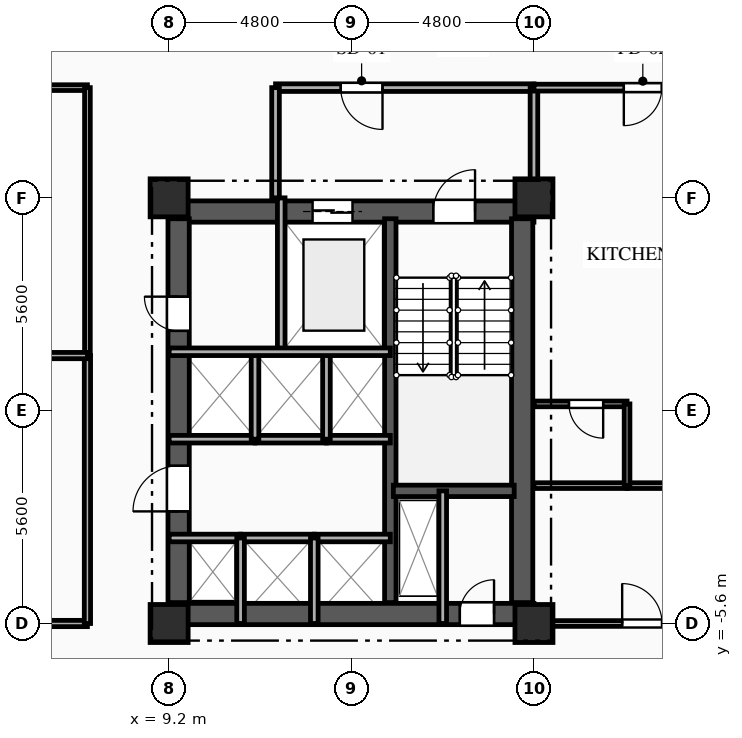
"""IFC4 building model, lengths in metres.
Left out: names, types, materials, properties, quantities, classifications, styles, units other than length and angle.
Written with IfcOpenShell. Run it as: python <this file> out.ifc"""

import sys

from ifc_helpers import new_model, si_unit, direction, frame, frame_2d, origin, origin_2d, place, context, subcontext, project, spatial, rectangle, extrude, element, fill, save


model = new_model("IFC4")
c1 = context("Model", 3, precision=1e-05, world=origin(), true_north=direction((0.0, 1.0)))
c2 = subcontext(c1, "Body", "Model", "MODEL_VIEW")
j1 = project(units=[si_unit("LENGTHUNIT", "METRE"), si_unit("PLANEANGLEUNIT", "RADIAN")], contexts=[c1])
p1 = place(None, origin())
s1 = spatial("IfcSite", under=j1, at=p1, CompositionType="ELEMENT")
p2 = place(p1, origin())
s2 = spatial("IfcBuilding", under=s1, at=p2, CompositionType="ELEMENT")
p3 = place(p2, frame((0.0, 0.0, 102.45)))
s3 = spatial("IfcBuildingStorey", under=s2, at=p3, CompositionType="ELEMENT", Elevation=102.45)
for number, where, z_axis, x_axis in (
    (1, (9.2, -5.6, 0.0), (0.0, 0.0, 1.0), (1.0, 0.0, 0.0)),
    (2, (9.2, 5.6, 0.0), (0.0, 0.0, 1.0), (1.0, 0.0, 0.0)),
    (3, (18.8, -5.6, 0.0), (0.0, 0.0, 1.0), (1.0, 0.0, 0.0)),
    (4, (18.8, 5.6, 0.0), (0.0, 0.0, 1.0), (1.0, 0.0, 0.0)),
):
    element("IfcColumn", number, at=place(p3, frame(where, z_axis=z_axis, x_axis=x_axis)), inside=s3, PredefinedType="COLUMN", context=c2, shape_type="SweptSolid", body=[
        extrude(rectangle(XDim=1.0, YDim=1.0, at=origin_2d()), origin(), (0.0, 0.0, 1.0), 3.35),
    ])
p4 = place(p3, frame((9.2, 5.24, 0.0), z_axis=(0.0, 0.0, 1.0), x_axis=(1.0, 0.0, 0.0)))
e5 = element("IfcWall", 5, at=p4, inside=s3, PredefinedType="SHEAR", context=c2, shape_type="SweptSolid", body=[
    extrude(rectangle(XDim=9.6, YDim=0.56, at=frame_2d((4.8, 0.0))), origin(), (0.0, 0.0, 1.0), 3.045),
])
p5 = place(p4, frame((6.95, 0.0, 0.0)))
e6 = element("IfcOpeningElement", 6, at=p5, cuts=e5, PredefinedType="OPENING", context=c2, shape_type="SweptSolid", body=[
    extrude(rectangle(XDim=1.1, YDim=2.15, at=frame_2d((0.55, 1.075))), frame((0.0, 0.29, 0.0), z_axis=(0.0, -1.0, 0.0), x_axis=(1.0, 0.0, 0.0)), (0.0, 0.0, 1.0), 0.58),
])
p6 = place(p4, frame((3.775, 0.0, 0.0)))
e7 = element("IfcOpeningElement", 7, at=p6, cuts=e5, PredefinedType="OPENING", context=c2, shape_type="SweptSolid", body=[
    extrude(rectangle(XDim=1.05, YDim=2.1, at=frame_2d((0.525, 1.05))), frame((0.0, 0.29, 0.0), z_axis=(0.0, -1.0, 0.0), x_axis=(1.0, 0.0, 0.0)), (0.0, 0.0, 1.0), 0.58),
])
p7 = place(p3, frame((9.2, -5.35, 0.0), z_axis=(0.0, 0.0, 1.0), x_axis=(1.0, 0.0, 0.0)))
e8 = element("IfcWall", 8, at=p7, inside=s3, PredefinedType="SHEAR", context=c2, shape_type="SweptSolid", body=[
    extrude(rectangle(XDim=9.6, YDim=0.56, at=frame_2d((4.8, 0.0))), origin(), (0.0, 0.0, 1.0), 3.045),
])
p8 = place(p7, frame((7.65, 0.0, 0.0)))
e9 = element("IfcOpeningElement", 9, at=p8, cuts=e8, PredefinedType="OPENING", context=c2, shape_type="SweptSolid", body=[
    extrude(rectangle(XDim=0.9, YDim=2.1, at=frame_2d((0.45, 1.05))), frame((0.0, 0.29, 0.0), z_axis=(0.0, -1.0, 0.0), x_axis=(1.0, 0.0, 0.0)), (0.0, 0.0, 1.0), 0.58),
])
p9 = place(p3, frame((9.45, -5.05, 0.0), z_axis=(0.0, 0.0, 1.0), x_axis=(0.0, 1.0, 0.0)))
e10 = element("IfcWall", 10, at=p9, inside=s3, PredefinedType="SHEAR", context=c2, shape_type="SweptSolid", body=[
    extrude(rectangle(XDim=10.1, YDim=0.56, at=frame_2d((5.05, 0.0))), origin(), (0.0, 0.0, 1.0), 3.045),
])
p10 = place(p9, frame((7.15, 0.0, 0.0)))
e11 = element("IfcOpeningElement", 11, at=p10, cuts=e10, PredefinedType="OPENING", context=c2, shape_type="SweptSolid", body=[
    extrude(rectangle(XDim=0.9, YDim=2.1, at=frame_2d((0.45, 1.05))), frame((0.0, 0.29, 0.0), z_axis=(0.0, -1.0, 0.0), x_axis=(1.0, 0.0, 0.0)), (0.0, 0.0, 1.0), 0.58),
])
p11 = place(p9, frame((2.4, 0.0, 0.0)))
e12 = element("IfcOpeningElement", 12, at=p11, cuts=e10, PredefinedType="OPENING", context=c2, shape_type="SweptSolid", body=[
    extrude(rectangle(XDim=1.2, YDim=2.15, at=frame_2d((0.6, 1.075))), frame((0.0, 0.29, 0.0), z_axis=(0.0, -1.0, 0.0), x_axis=(1.0, 0.0, 0.0)), (0.0, 0.0, 1.0), 0.58),
])
p12 = place(p3, frame((18.49, -5.05, 0.0), z_axis=(0.0, 0.0, 1.0), x_axis=(0.0, 1.0, 0.0)))
e13 = element("IfcWall", 13, at=p12, inside=s3, PredefinedType="SHEAR", context=c2, shape_type="SweptSolid", body=[
    extrude(rectangle(XDim=10.1, YDim=0.56, at=frame_2d((5.05, 0.0))), origin(), (0.0, 0.0, 1.0), 3.045),
])
p13 = place(p3, frame((15.02, -5.05, 0.0), z_axis=(0.0, 0.0, 1.0), x_axis=(0.0, 1.0, 0.0)))
e14 = element("IfcWall", 14, at=p13, inside=s3, PredefinedType="SHEAR", context=c2, shape_type="SweptSolid", body=[
    extrude(rectangle(XDim=10.1, YDim=0.3, at=frame_2d((5.05, 0.0))), origin(), (0.0, 0.0, 1.0), 3.045),
])
p14 = place(p3, frame((15.1, -2.11, 0.0), z_axis=(0.0, 0.0, 1.0), x_axis=(1.0, 0.0, 0.0)))
e15 = element("IfcWall", 15, at=p14, inside=s3, PredefinedType="SHEAR", context=c2, shape_type="SweptSolid", body=[
    extrude(rectangle(XDim=3.18, YDim=0.3, at=frame_2d((1.59, 0.0))), origin(), (0.0, 0.0, 1.0), 3.045),
])
p15 = place(p3, frame((16.4, -2.11, 0.0), z_axis=(0.0, 0.0, 1.0), x_axis=(0.0, -1.0, 0.0)))
e16 = element("IfcWall", 16, at=p15, inside=s3, PredefinedType="PARTITIONING", context=c2, shape_type="SweptSolid", body=[
    extrude(rectangle(XDim=3.49, YDim=0.2, at=frame_2d((1.745, 0.0))), origin(), (0.0, 0.0, 1.0), 3.045),
])
p16 = place(p3, frame((12.15, 5.6, 0.0), z_axis=(0.0, 0.0, 1.0), x_axis=(0.0, -1.0, 0.0)))
e17 = element("IfcWall", 17, at=p16, inside=s3, PredefinedType="PARTITIONING", context=c2, shape_type="SweptSolid", body=[
    extrude(rectangle(XDim=4.05, YDim=0.2, at=frame_2d((2.025, 0.0))), origin(), (0.0, 0.0, 1.0), 3.045),
])
p17 = place(p3, frame((18.8, 8.5, 0.0), z_axis=(0.0, 0.0, 1.0), x_axis=(-1.0, 0.0, 0.0)))
e18 = element("IfcWall", 18, at=p17, inside=s3, PredefinedType="PARTITIONING", context=c2, shape_type="SweptSolid", body=[
    extrude(rectangle(XDim=6.8, YDim=0.2, at=frame_2d((3.4, 0.0))), origin(), (0.0, 0.0, 1.0), 3.045),
])
p18 = place(p17, frame((3.985, 0.0, 0.0)))
e19 = element("IfcOpeningElement", 19, at=p18, cuts=e18, PredefinedType="OPENING", context=c2, shape_type="SweptSolid", body=[
    extrude(rectangle(XDim=1.1, YDim=2.15, at=frame_2d((0.55, 1.075))), frame((0.0, 0.11, 0.0), z_axis=(0.0, -1.0, 0.0), x_axis=(1.0, 0.0, 0.0)), (0.0, 0.0, 1.0), 0.22),
])
p19 = place(p3, frame((12.0, 8.5, 0.0), z_axis=(0.0, 0.0, 1.0), x_axis=(0.0, -1.0, 0.0)))
e20 = element("IfcWall", 20, at=p19, inside=s3, PredefinedType="PARTITIONING", context=c2, shape_type="SweptSolid", body=[
    extrude(rectangle(XDim=2.9, YDim=0.2, at=frame_2d((1.45, 0.0))), origin(), (0.0, 0.0, 1.0), 3.045),
])
p20 = place(p3, frame((18.8, 5.6, 0.0), z_axis=(0.0, 0.0, 1.0), x_axis=(0.0, 1.0, 0.0)))
e21 = element("IfcWall", 21, at=p20, inside=s3, PredefinedType="PARTITIONING", context=c2, shape_type="SweptSolid", body=[
    extrude(rectangle(XDim=2.9, YDim=0.2, at=frame_2d((1.45, 0.0))), origin(), (0.0, 0.0, 1.0), 2.53),
])
p21 = place(p3, frame((9.2, -3.35, 0.0), z_axis=(0.0, 0.0, 1.0), x_axis=(1.0, 0.0, 0.0)))
e22 = element("IfcWall", 22, at=p21, inside=s3, PredefinedType="PARTITIONING", context=c2, shape_type="SweptSolid", body=[
    extrude(rectangle(XDim=1.88, YDim=0.2, at=frame_2d((0.94, 0.0))), origin(), (0.0, 0.0, 1.0), 2.76),
])
p22 = place(p3, frame((11.08, -3.35, 0.0), z_axis=(0.0, 0.0, 1.0), x_axis=(1.0, 0.0, 0.0)))
e23 = element("IfcWall", 23, at=p22, inside=s3, PredefinedType="PARTITIONING", context=c2, shape_type="SweptSolid", body=[
    extrude(rectangle(XDim=1.94, YDim=0.2, at=frame_2d((0.97, 0.0))), origin(), (0.0, 0.0, 1.0), 3.045),
])
p23 = place(p3, frame((13.02, -3.35, 0.0), z_axis=(0.0, 0.0, 1.0), x_axis=(1.0, 0.0, 0.0)))
e24 = element("IfcWall", 24, at=p23, inside=s3, PredefinedType="PARTITIONING", context=c2, shape_type="SweptSolid", body=[
    extrude(rectangle(XDim=2.0, YDim=0.2, at=frame_2d((1.0, 0.0))), origin(), (0.0, 0.0, 1.0), 3.045),
])
p24 = place(p3, frame((11.46, -0.75, 0.0), z_axis=(0.0, 0.0, 1.0), x_axis=(-1.0, 0.0, 0.0)))
e25 = element("IfcWall", 25, at=p24, inside=s3, PredefinedType="PARTITIONING", context=c2, shape_type="SweptSolid", body=[
    extrude(rectangle(XDim=2.26, YDim=0.2, at=frame_2d((1.13, 0.0))), origin(), (0.0, 0.0, 1.0), 3.045),
])
p25 = place(p3, frame((13.34, -0.75, 0.0), z_axis=(0.0, 0.0, 1.0), x_axis=(-1.0, 0.0, 0.0)))
e26 = element("IfcWall", 26, at=p25, inside=s3, PredefinedType="PARTITIONING", context=c2, shape_type="SweptSolid", body=[
    extrude(rectangle(XDim=1.88, YDim=0.2, at=frame_2d((0.94, 0.0))), origin(), (0.0, 0.0, 1.0), 3.045),
])
p26 = place(p3, frame((15.02, -0.75, 0.0), z_axis=(0.0, 0.0, 1.0), x_axis=(-1.0, 0.0, 0.0)))
e27 = element("IfcWall", 27, at=p26, inside=s3, PredefinedType="PARTITIONING", context=c2, shape_type="SweptSolid", body=[
    extrude(rectangle(XDim=1.68, YDim=0.2, at=frame_2d((0.84, 0.0))), origin(), (0.0, 0.0, 1.0), 3.045),
])
for number, where, z_axis, x_axis in (
    (28, (11.08, -5.6, 0.0), (0.0, 0.0, 1.0), (0.0, 1.0, 0.0)),
    (29, (13.02, -5.6, 0.0), (0.0, 0.0, 1.0), (0.0, 1.0, 0.0)),
):
    element("IfcWall", number, at=place(p3, frame(where, z_axis=z_axis, x_axis=x_axis)), inside=s3, PredefinedType="PARTITIONING", context=c2, shape_type="SweptSolid", body=[
        extrude(rectangle(XDim=2.25, YDim=0.2, at=frame_2d((1.125, 0.0))), origin(), (0.0, 0.0, 1.0), 3.045),
    ])
for number, where, z_axis, x_axis in (
    (30, (11.46, -0.75, 0.0), (0.0, 0.0, 1.0), (0.0, 1.0, 0.0)),
    (31, (13.34, -0.75, 0.0), (0.0, 0.0, 1.0), (0.0, 1.0, 0.0)),
):
    element("IfcWall", number, at=place(p3, frame(where, z_axis=z_axis, x_axis=x_axis)), inside=s3, PredefinedType="PARTITIONING", context=c2, shape_type="SweptSolid", body=[
        extrude(rectangle(XDim=2.3, YDim=0.2, at=frame_2d((1.15, 0.0))), origin(), (0.0, 0.0, 1.0), 3.045),
    ])
p27 = place(p3, frame((23.0, 8.5, 0.0), z_axis=(0.0, 0.0, 1.0), x_axis=(-1.0, 0.0, 0.0)))
e32 = element("IfcWall", 32, at=p27, inside=s3, PredefinedType="PARTITIONING", context=c2, shape_type="SweptSolid", body=[
    extrude(rectangle(XDim=4.2, YDim=0.18, at=frame_2d((2.1, 0.0))), origin(), (0.0, 0.0, 1.0), 3.045),
])
p28 = place(p27, frame((0.835, 0.0, 0.0)))
e33 = element("IfcOpeningElement", 33, at=p28, cuts=e32, PredefinedType="OPENING", context=c2, shape_type="SweptSolid", body=[
    extrude(rectangle(XDim=1.0, YDim=2.15, at=frame_2d((0.5, 1.075))), frame((0.0, 0.1, 0.0), z_axis=(0.0, -1.0, 0.0), x_axis=(1.0, 0.0, 0.0)), (0.0, 0.0, 1.0), 0.2),
])
p29 = place(p3, frame((7.05, 8.5, 0.0), z_axis=(0.0, 0.0, 1.0), x_axis=(-1.0, 0.0, 0.0)))
e34 = element("IfcWall", 34, at=p29, inside=s3, PredefinedType="PARTITIONING", context=c2, shape_type="SweptSolid", body=[
    extrude(rectangle(XDim=7.05, YDim=0.15, at=frame_2d((3.525, 0.0))), origin(), (0.0, 0.0, 1.0), 3.045),
])
p30 = place(p3, frame((18.8, -5.6, 0.0), z_axis=(0.0, 0.0, 1.0), x_axis=(1.0, 0.0, 0.0)))
e35 = element("IfcWall", 35, at=p30, inside=s3, PredefinedType="PARTITIONING", context=c2, shape_type="SweptSolid", body=[
    extrude(rectangle(XDim=4.2, YDim=0.15, at=frame_2d((2.1, 0.0))), origin(), (0.0, 0.0, 1.0), 2.53),
])
p31 = place(p30, frame((2.321, 0.0, 0.0)))
e36 = element("IfcOpeningElement", 36, at=p31, cuts=e35, PredefinedType="OPENING", context=c2, shape_type="SweptSolid", body=[
    extrude(rectangle(XDim=1.05, YDim=2.15, at=frame_2d((0.525, 1.075))), frame((0.0, 0.085, 0.0), z_axis=(0.0, -1.0, 0.0), x_axis=(1.0, 0.0, 0.0)), (0.0, 0.0, 1.0), 0.17),
])
p32 = place(p3, frame((0.0, -5.6, 0.0), z_axis=(0.0, 0.0, 1.0), x_axis=(1.0, 0.0, 0.0)))
e37 = element("IfcWall", 37, at=p32, inside=s3, PredefinedType="PARTITIONING", context=c2, shape_type="SweptSolid", body=[
    extrude(rectangle(XDim=7.05, YDim=0.165, at=frame_2d((3.525, 0.0))), origin(), (0.0, 0.0, 1.0), 2.53),
])
p33 = place(p3, frame((7.05, -5.6, 0.0), z_axis=(0.0, 0.0, 1.0), x_axis=(0.0, 1.0, 0.0)))
e38 = element("IfcWall", 38, at=p33, inside=s3, PredefinedType="PARTITIONING", context=c2, shape_type="SweptSolid", body=[
    extrude(rectangle(XDim=7.05, YDim=0.165, at=frame_2d((3.525, 0.0))), origin(), (0.0, 0.0, 1.0), 3.045),
])
p34 = place(p3, frame((7.05, 1.45, 0.0), z_axis=(0.0, 0.0, 1.0), x_axis=(0.0, 1.0, 0.0)))
e39 = element("IfcWall", 39, at=p34, inside=s3, PredefinedType="PARTITIONING", context=c2, shape_type="SweptSolid", body=[
    extrude(rectangle(XDim=7.05, YDim=0.15, at=frame_2d((3.525, 0.0))), origin(), (0.0, 0.0, 1.0), 3.045),
])
p35 = place(p3, frame((21.25, -1.972, 0.0), z_axis=(0.0, 0.0, 1.0), x_axis=(1.0, 0.0, 0.0)))
e40 = element("IfcWall", 40, at=p35, inside=s3, PredefinedType="PARTITIONING", context=c2, shape_type="SweptSolid", body=[
    extrude(rectangle(XDim=4.586, YDim=0.15, at=frame_2d((2.293, 0.0))), origin(), (0.0, 0.0, 1.0), 3.045),
])
p36 = place(p3, frame((18.8, -1.972, 0.0), z_axis=(0.0, 0.0, 1.0), x_axis=(1.0, 0.0, 0.0)))
e41 = element("IfcWall", 41, at=p36, inside=s3, PredefinedType="PLUMBINGWALL", context=c2, shape_type="SweptSolid", body=[
    extrude(rectangle(XDim=2.45, YDim=0.15, at=frame_2d((1.225, 0.0))), origin(), (0.0, 0.0, 1.0), 2.53),
])
p37 = place(p3, frame((21.25, 0.178, 0.0), z_axis=(0.0, 0.0, 1.0), x_axis=(-1.0, 0.0, 0.0)))
e42 = element("IfcWall", 42, at=p37, inside=s3, PredefinedType="PLUMBINGWALL", context=c2, shape_type="SweptSolid", body=[
    extrude(rectangle(XDim=2.45, YDim=0.15, at=frame_2d((1.225, 0.0))), origin(), (0.0, 0.0, 1.0), 3.045),
])
p38 = place(p37, frame((0.629, 0.0, 0.0)))
e43 = element("IfcOpeningElement", 43, at=p38, cuts=e42, PredefinedType="OPENING", context=c2, shape_type="SweptSolid", body=[
    extrude(rectangle(XDim=0.9, YDim=2.1, at=frame_2d((0.45, 1.05))), frame((0.0, 0.085, 0.0), z_axis=(0.0, -1.0, 0.0), x_axis=(1.0, 0.0, 0.0)), (0.0, 0.0, 1.0), 0.17),
])
p39 = place(p3, frame((21.25, -1.972, 0.0), z_axis=(0.0, 0.0, 1.0), x_axis=(0.0, 1.0, 0.0)))
e44 = element("IfcWall", 44, at=p39, inside=s3, PredefinedType="PLUMBINGWALL", context=c2, shape_type="SweptSolid", body=[
    extrude(rectangle(XDim=2.15, YDim=0.15, at=frame_2d((1.075, 0.0))), origin(), (0.0, 0.0, 1.0), 3.045),
])
p40 = place(p3, frame((-7.05, 1.45, 0.0), z_axis=(0.0, 0.0, 1.0), x_axis=(1.0, 0.0, 0.0)))
e45 = element("IfcWall", 45, at=p40, inside=s3, PredefinedType="PARTITIONING", context=c2, shape_type="SweptSolid", body=[
    extrude(rectangle(XDim=14.1, YDim=0.165, at=frame_2d((7.05, 0.0))), origin(), (0.0, 0.0, 1.0), 3.045),
])
p41 = place(p3, frame((9.2, 1.55, 0.0), z_axis=(0.0, 0.0, 1.0), x_axis=(1.0, 0.0, 0.0)))
e46 = element("IfcWall", 46, at=p41, inside=s3, PredefinedType="PARTITIONING", context=c2, shape_type="SweptSolid", body=[
    extrude(rectangle(XDim=5.82, YDim=0.2, at=frame_2d((2.91, 0.0))), origin(), (0.0, 0.0, 1.0), 3.045),
])
p42 = place(p5, origin())
e47 = element("IfcDoor", 47, at=p42, inside=s3, OperationType="SINGLE_SWING_RIGHT", PredefinedType="DOOR", context=c2, shape_type="SweptSolid", body=[
    extrude(rectangle(XDim=1.1, YDim=2.15, at=frame_2d((0.55, 1.075))), frame((0.0, 0.025, 0.0), z_axis=(0.0, -1.0, 0.0), x_axis=(1.0, 0.0, 0.0)), (0.0, 0.0, 1.0), 0.05),
])
fill(e6, e47)
p43 = place(p6, origin())
e48 = element("IfcDoor", 48, at=p43, inside=s3, OperationType="DOUBLE_DOOR_SLIDING", PredefinedType="DOOR", context=c2, shape_type="SweptSolid", body=[
    extrude(rectangle(XDim=1.05, YDim=2.1, at=frame_2d((0.525, 1.05))), frame((0.0, 0.025, 0.0), z_axis=(0.0, -1.0, 0.0), x_axis=(1.0, 0.0, 0.0)), (0.0, 0.0, 1.0), 0.05),
])
fill(e7, e48)
p44 = place(p8, origin())
e49 = element("IfcDoor", 49, at=p44, inside=s3, OperationType="SINGLE_SWING_RIGHT", PredefinedType="DOOR", context=c2, shape_type="SweptSolid", body=[
    extrude(rectangle(XDim=0.9, YDim=2.1, at=frame_2d((0.45, 1.05))), frame((0.0, 0.025, 0.0), z_axis=(0.0, -1.0, 0.0), x_axis=(1.0, 0.0, 0.0)), (0.0, 0.0, 1.0), 0.05),
])
fill(e9, e49)
p45 = place(p18, origin())
e50 = element("IfcDoor", 50, at=p45, inside=s3, OperationType="SINGLE_SWING_LEFT", PredefinedType="DOOR", context=c2, shape_type="SweptSolid", body=[
    extrude(rectangle(XDim=1.1, YDim=2.15, at=frame_2d((0.55, 1.075))), frame((0.0, 0.025, 0.0), z_axis=(0.0, -1.0, 0.0), x_axis=(1.0, 0.0, 0.0)), (0.0, 0.0, 1.0), 0.05),
])
fill(e19, e50)
p46 = place(p10, origin())
e51 = element("IfcDoor", 51, at=p46, inside=s3, OperationType="SINGLE_SWING_RIGHT", PredefinedType="DOOR", context=c2, shape_type="SweptSolid", body=[
    extrude(rectangle(XDim=0.9, YDim=2.1, at=frame_2d((0.45, 1.05))), frame((0.0, 0.025, 0.0), z_axis=(0.0, -1.0, 0.0), x_axis=(1.0, 0.0, 0.0)), (0.0, 0.0, 1.0), 0.05),
])
fill(e11, e51)
p47 = place(p11, origin())
e52 = element("IfcDoor", 52, at=p47, inside=s3, OperationType="SINGLE_SWING_LEFT", PredefinedType="DOOR", context=c2, shape_type="SweptSolid", body=[
    extrude(rectangle(XDim=1.2, YDim=2.15, at=frame_2d((0.6, 1.075))), frame((0.0, 0.025, 0.0), z_axis=(0.0, -1.0, 0.0), x_axis=(1.0, 0.0, 0.0)), (0.0, 0.0, 1.0), 0.05),
])
fill(e12, e52)
p48 = place(p28, origin())
e53 = element("IfcDoor", 53, at=p48, inside=s3, OperationType="SINGLE_SWING_RIGHT", PredefinedType="DOOR", context=c2, shape_type="SweptSolid", body=[
    extrude(rectangle(XDim=1.0, YDim=2.15, at=frame_2d((0.5, 1.075))), frame((0.0, 0.025, 0.0), z_axis=(0.0, -1.0, 0.0), x_axis=(1.0, 0.0, 0.0)), (0.0, 0.0, 1.0), 0.05),
])
fill(e33, e53)
p49 = place(p31, origin())
e54 = element("IfcDoor", 54, at=p49, inside=s3, OperationType="SINGLE_SWING_LEFT", PredefinedType="DOOR", context=c2, shape_type="SweptSolid", body=[
    extrude(rectangle(XDim=1.05, YDim=2.15, at=frame_2d((0.525, 1.075))), frame((0.0, 0.025, 0.0), z_axis=(0.0, -1.0, 0.0), x_axis=(1.0, 0.0, 0.0)), (0.0, 0.0, 1.0), 0.05),
])
fill(e36, e54)
p50 = place(p38, origin())
e55 = element("IfcDoor", 55, at=p50, inside=s3, OperationType="SINGLE_SWING_LEFT", PredefinedType="DOOR", context=c2, shape_type="SweptSolid", body=[
    extrude(rectangle(XDim=0.9, YDim=2.1, at=frame_2d((0.45, 1.05))), frame((0.0, 0.025, 0.0), z_axis=(0.0, -1.0, 0.0), x_axis=(1.0, 0.0, 0.0)), (0.0, 0.0, 1.0), 0.05),
])
fill(e43, e55)
save(model, sys.argv[1])
